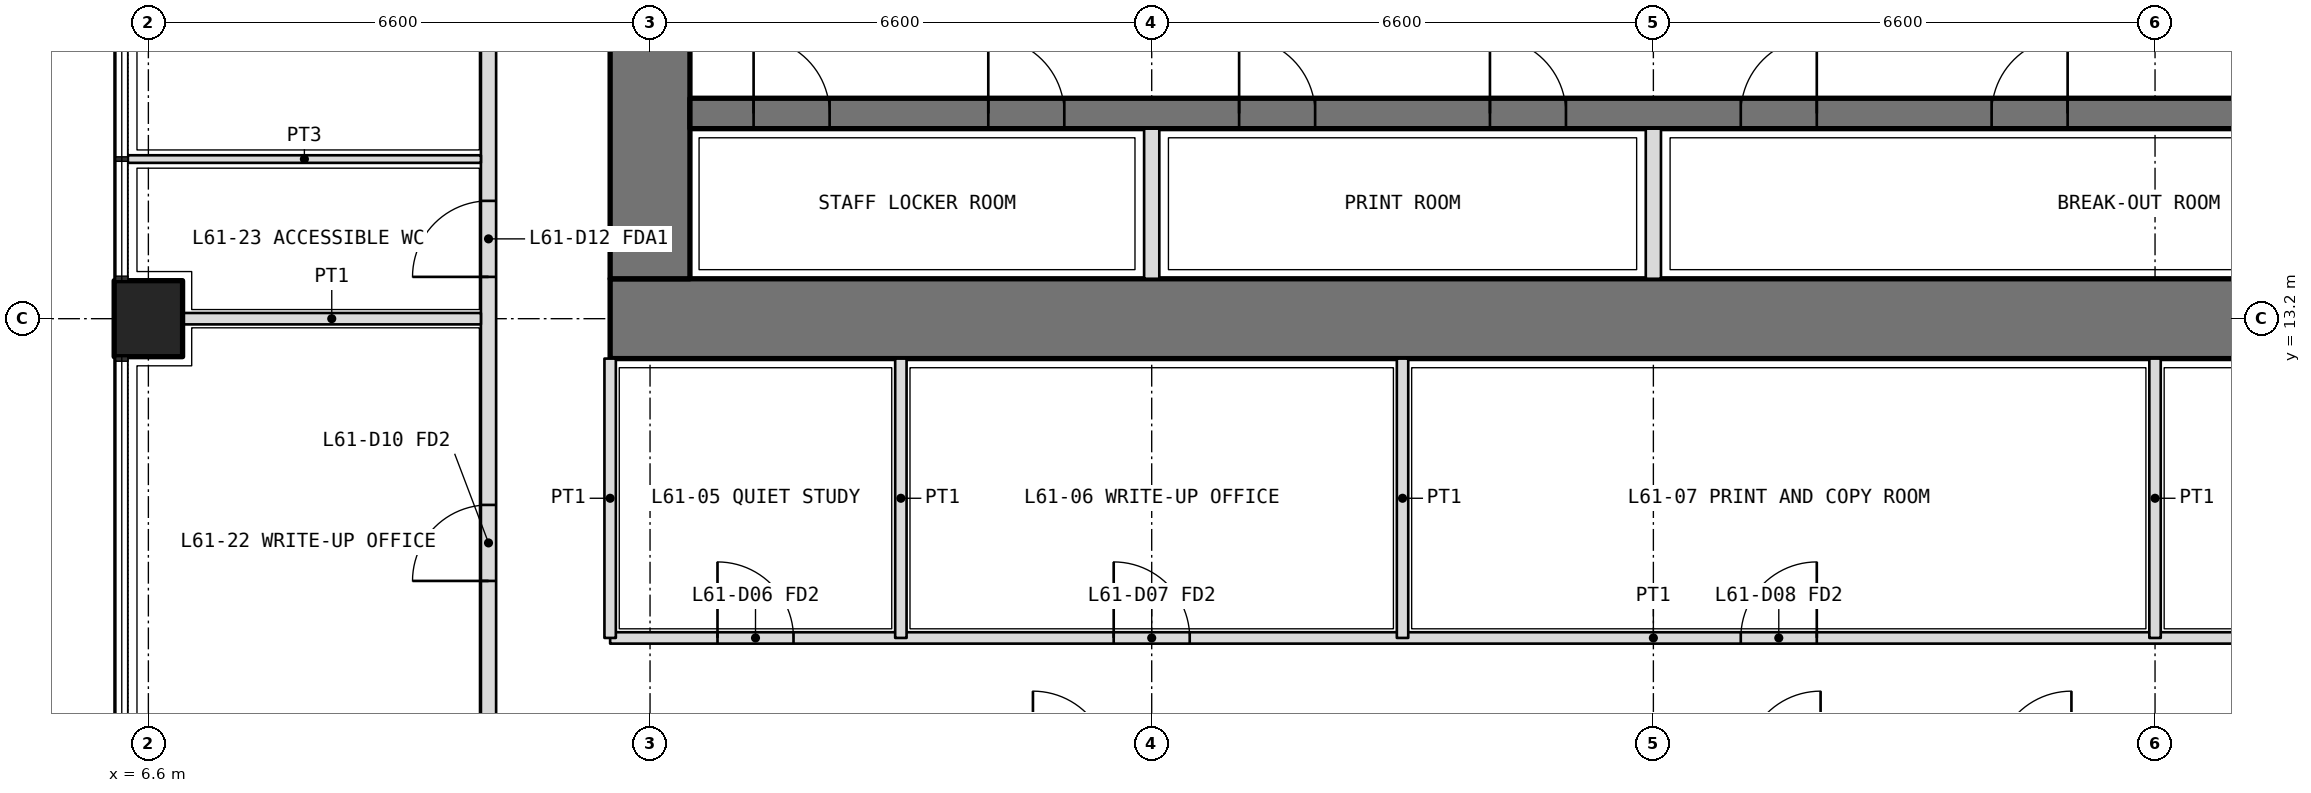
"""IFC4 building model, lengths in metres.
Left out: names, types, materials, properties, quantities, classifications, styles, units other than length and angle.
Written with IfcOpenShell. Run it as: python <this file> out.ifc"""

import sys

from ifc_helpers import new_model, si_unit, direction, frame, frame_2d, origin, origin_2d, place, context, subcontext, project, spatial, rectangle, extrude, element, fill, save


model = new_model("IFC4")
c1 = context("Model", 3, precision=1e-05, world=origin(), true_north=direction((0.0, 1.0)))
c2 = subcontext(c1, "Body", "Model", "MODEL_VIEW")
j1 = project(units=[si_unit("LENGTHUNIT", "METRE"), si_unit("PLANEANGLEUNIT", "RADIAN")], contexts=[c1])
p1 = place(None, origin())
s1 = spatial("IfcSite", under=j1, at=p1, CompositionType="ELEMENT")
p2 = place(p1, origin())
s2 = spatial("IfcBuilding", under=s1, at=p2, CompositionType="ELEMENT")
p3 = place(p2, frame((0.0, 0.0, 267.0)))
s3 = spatial("IfcBuildingStorey", under=s2, at=p3, CompositionType="ELEMENT", Elevation=267.0)
p4 = place(p3, frame((6.6, 13.2, 0.0), z_axis=(0.0, 0.0, 1.0), x_axis=(0.0, 1.0, 0.0)))
e1 = element("IfcColumn", 1, at=p4, inside=s3, PredefinedType="COLUMN", context=c2, shape_type="SweptSolid", body=[
    extrude(rectangle(XDim=1.0, YDim=0.9, at=origin_2d()), origin(), (0.0, 0.0, 1.0), 4.2),
])
p5 = place(p3, frame((12.675, 13.2, 0.0), z_axis=(0.0, 0.0, 1.0), x_axis=(1.0, 0.0, 0.0)))
e2 = element("IfcWall", 2, at=p5, inside=s3, PredefinedType="SHEAR", context=c2, shape_type="SweptSolid", body=[
    extrude(rectangle(XDim=27.45, YDim=1.05, at=frame_2d((13.725, 0.0))), origin(), (0.0, 0.0, 1.0), 4.2),
])
p6 = place(p3, frame((13.2, 32.475, 0.0), z_axis=(0.0, 0.0, 1.0), x_axis=(0.0, -1.0, 0.0)))
e3 = element("IfcWall", 3, at=p6, inside=s3, PredefinedType="SHEAR", context=c2, shape_type="SweptSolid", body=[
    extrude(rectangle(XDim=18.75, YDim=1.05, at=frame_2d((9.375, 0.0))), origin(), (0.0, 0.0, 1.0), 4.2),
])
p7 = place(p6, frame((14.125, 0.0, 0.0)))
e4 = element("IfcOpeningElement", 4, at=p7, cuts=e3, PredefinedType="OPENING", context=c2, shape_type="SweptSolid", body=[
    extrude(rectangle(XDim=1.6, YDim=2.1, at=frame_2d((0.8, 1.05))), frame((0.0, 0.535, 0.0), z_axis=(0.0, -1.0, 0.0), x_axis=(1.0, 0.0, 0.0)), (0.0, 0.0, 1.0), 1.07),
])
p8 = place(p6, frame((3.325, 0.0, 0.0)))
e5 = element("IfcOpeningElement", 5, at=p8, cuts=e3, PredefinedType="OPENING", context=c2, shape_type="SweptSolid", body=[
    extrude(rectangle(XDim=1.6, YDim=2.1, at=frame_2d((0.8, 1.05))), frame((0.0, 0.535, 0.0), z_axis=(0.0, -1.0, 0.0), x_axis=(1.0, 0.0, 0.0)), (0.0, 0.0, 1.0), 1.07),
])
p9 = place(p3, frame((13.725, 15.9, 0.0), z_axis=(0.0, 0.0, 1.0), x_axis=(1.0, 0.0, 0.0)))
e6 = element("IfcWall", 6, at=p9, inside=s3, PredefinedType="SHEAR", context=c2, shape_type="SweptSolid", body=[
    extrude(rectangle(XDim=25.35, YDim=0.4, at=frame_2d((12.675, 0.0))), origin(), (0.0, 0.0, 1.0), 4.2),
])
p10 = place(p9, frame((0.837, 0.0, 0.0)))
e7 = element("IfcOpeningElement", 7, at=p10, cuts=e6, PredefinedType="OPENING", context=c2, shape_type="SweptSolid", body=[
    extrude(rectangle(XDim=1.0, YDim=2.1, at=frame_2d((0.5, 1.05))), frame((0.0, 0.21, 0.0), z_axis=(0.0, -1.0, 0.0), x_axis=(1.0, 0.0, 0.0)), (0.0, 0.0, 1.0), 0.42),
])
p11 = place(p9, frame((3.925, 0.0, 0.0)))
e8 = element("IfcOpeningElement", 8, at=p11, cuts=e6, PredefinedType="OPENING", context=c2, shape_type="SweptSolid", body=[
    extrude(rectangle(XDim=1.0, YDim=2.1, at=frame_2d((0.5, 1.05))), frame((0.0, 0.21, 0.0), z_axis=(0.0, -1.0, 0.0), x_axis=(1.0, 0.0, 0.0)), (0.0, 0.0, 1.0), 0.42),
])
p12 = place(p9, frame((7.225, 0.0, 0.0)))
e9 = element("IfcOpeningElement", 9, at=p12, cuts=e6, PredefinedType="OPENING", context=c2, shape_type="SweptSolid", body=[
    extrude(rectangle(XDim=1.0, YDim=2.1, at=frame_2d((0.5, 1.05))), frame((0.0, 0.21, 0.0), z_axis=(0.0, -1.0, 0.0), x_axis=(1.0, 0.0, 0.0)), (0.0, 0.0, 1.0), 0.42),
])
p13 = place(p9, frame((10.525, 0.0, 0.0)))
e10 = element("IfcOpeningElement", 10, at=p13, cuts=e6, PredefinedType="OPENING", context=c2, shape_type="SweptSolid", body=[
    extrude(rectangle(XDim=1.0, YDim=2.1, at=frame_2d((0.5, 1.05))), frame((0.0, 0.21, 0.0), z_axis=(0.0, -1.0, 0.0), x_axis=(1.0, 0.0, 0.0)), (0.0, 0.0, 1.0), 0.42),
])
p14 = place(p9, frame((13.825, 0.0, 0.0)))
e11 = element("IfcOpeningElement", 11, at=p14, cuts=e6, PredefinedType="OPENING", context=c2, shape_type="SweptSolid", body=[
    extrude(rectangle(XDim=1.0, YDim=2.1, at=frame_2d((0.5, 1.05))), frame((0.0, 0.21, 0.0), z_axis=(0.0, -1.0, 0.0), x_axis=(1.0, 0.0, 0.0)), (0.0, 0.0, 1.0), 0.42),
])
p15 = place(p9, frame((17.125, 0.0, 0.0)))
e12 = element("IfcOpeningElement", 12, at=p15, cuts=e6, PredefinedType="OPENING", context=c2, shape_type="SweptSolid", body=[
    extrude(rectangle(XDim=1.0, YDim=2.1, at=frame_2d((0.5, 1.05))), frame((0.0, 0.21, 0.0), z_axis=(0.0, -1.0, 0.0), x_axis=(1.0, 0.0, 0.0)), (0.0, 0.0, 1.0), 0.42),
])
p16 = place(p9, frame((20.425, 0.0, 0.0)))
e13 = element("IfcOpeningElement", 13, at=p16, cuts=e6, PredefinedType="OPENING", context=c2, shape_type="SweptSolid", body=[
    extrude(rectangle(XDim=1.0, YDim=2.1, at=frame_2d((0.5, 1.05))), frame((0.0, 0.21, 0.0), z_axis=(0.0, -1.0, 0.0), x_axis=(1.0, 0.0, 0.0)), (0.0, 0.0, 1.0), 0.42),
])
p17 = place(p9, frame((23.512, 0.0, 0.0)))
e14 = element("IfcOpeningElement", 14, at=p17, cuts=e6, PredefinedType="OPENING", context=c2, shape_type="SweptSolid", body=[
    extrude(rectangle(XDim=1.0, YDim=2.1, at=frame_2d((0.5, 1.05))), frame((0.0, 0.21, 0.0), z_axis=(0.0, -1.0, 0.0), x_axis=(1.0, 0.0, 0.0)), (0.0, 0.0, 1.0), 0.42),
])
for number, where, z_axis, x_axis in (
    (15, (19.8, 13.725, 0.0), (0.0, 0.0, 1.0), (0.0, 1.0, 0.0)),
    (16, (26.4, 13.725, 0.0), (0.0, 0.0, 1.0), (0.0, 1.0, 0.0)),
):
    element("IfcWall", number, at=place(p3, frame(where, z_axis=z_axis, x_axis=x_axis)), inside=s3, PredefinedType="PARTITIONING", context=c2, shape_type="SweptSolid", body=[
        extrude(rectangle(XDim=1.975, YDim=0.2, at=frame_2d((0.987, 0.0))), origin(), (0.0, 0.0, 1.0), 4.2),
    ])
p18 = place(p3, frame((12.675, 9.0, 0.0), z_axis=(0.0, 0.0, 1.0), x_axis=(1.0, 0.0, 0.0)))
e17 = element("IfcWall", 17, at=p18, inside=s3, PredefinedType="PARTITIONING", context=c2, shape_type="SweptSolid", body=[
    extrude(rectangle(XDim=27.45, YDim=0.15, at=frame_2d((13.725, 0.0))), origin(), (0.0, 0.0, 1.0), 3.0),
])
p19 = place(p18, frame((1.413, 0.0, 0.0)))
e18 = element("IfcOpeningElement", 18, at=p19, cuts=e17, PredefinedType="OPENING", context=c2, shape_type="SweptSolid", body=[
    extrude(rectangle(XDim=1.0, YDim=2.1, at=frame_2d((0.5, 1.05))), frame((0.0, 0.085, 0.0), z_axis=(0.0, -1.0, 0.0), x_axis=(1.0, 0.0, 0.0)), (0.0, 0.0, 1.0), 0.17),
])
p20 = place(p18, frame((6.625, 0.0, 0.0)))
e19 = element("IfcOpeningElement", 19, at=p20, cuts=e17, PredefinedType="OPENING", context=c2, shape_type="SweptSolid", body=[
    extrude(rectangle(XDim=1.0, YDim=2.1, at=frame_2d((0.5, 1.05))), frame((0.0, 0.085, 0.0), z_axis=(0.0, -1.0, 0.0), x_axis=(1.0, 0.0, 0.0)), (0.0, 0.0, 1.0), 0.17),
])
p21 = place(p18, frame((14.875, 0.0, 0.0)))
e20 = element("IfcOpeningElement", 20, at=p21, cuts=e17, PredefinedType="OPENING", context=c2, shape_type="SweptSolid", body=[
    extrude(rectangle(XDim=1.0, YDim=2.1, at=frame_2d((0.5, 1.05))), frame((0.0, 0.085, 0.0), z_axis=(0.0, -1.0, 0.0), x_axis=(1.0, 0.0, 0.0)), (0.0, 0.0, 1.0), 0.17),
])
p22 = place(p18, frame((23.387, 0.0, 0.0)))
e21 = element("IfcOpeningElement", 21, at=p22, cuts=e17, PredefinedType="OPENING", context=c2, shape_type="SweptSolid", body=[
    extrude(rectangle(XDim=1.0, YDim=2.1, at=frame_2d((0.5, 1.05))), frame((0.0, 0.085, 0.0), z_axis=(0.0, -1.0, 0.0), x_axis=(1.0, 0.0, 0.0)), (0.0, 0.0, 1.0), 0.17),
])
p23 = place(p3, frame((12.675, 12.675, 0.0), z_axis=(0.0, 0.0, 1.0), x_axis=(0.0, -1.0, 0.0)))
e22 = element("IfcWall", 22, at=p23, inside=s3, PredefinedType="PARTITIONING", context=c2, shape_type="SweptSolid", body=[
    extrude(rectangle(XDim=3.675, YDim=0.15, at=frame_2d((1.837, 0.0))), origin(), (0.0, 0.0, 1.0), 3.0),
])
for number, where, z_axis, x_axis in (
    (23, (16.5, 12.675, 0.0), (0.0, 0.0, 1.0), (0.0, -1.0, 0.0)),
    (24, (23.1, 12.675, 0.0), (0.0, 0.0, 1.0), (0.0, -1.0, 0.0)),
):
    element("IfcWall", number, at=place(p3, frame(where, z_axis=z_axis, x_axis=x_axis)), inside=s3, PredefinedType="PARTITIONING", context=c2, shape_type="SweptSolid", body=[
        extrude(rectangle(XDim=3.675, YDim=0.15, at=frame_2d((1.837, 0.0))), origin(), (0.0, 0.0, 1.0), 3.9),
    ])
p24 = place(p3, frame((33.0, 12.675, 0.0), z_axis=(0.0, 0.0, 1.0), x_axis=(0.0, -1.0, 0.0)))
e25 = element("IfcWall", 25, at=p24, inside=s3, PredefinedType="PARTITIONING", context=c2, shape_type="SweptSolid", body=[
    extrude(rectangle(XDim=3.675, YDim=0.15, at=frame_2d((1.837, 0.0))), origin(), (0.0, 0.0, 1.0), 3.0),
])
p25 = place(p3, frame((11.075, 7.4, 0.0), z_axis=(0.0, 0.0, 1.0), x_axis=(0.0, 1.0, 0.0)))
e26 = element("IfcWall", 26, at=p25, inside=s3, PredefinedType="PARTITIONING", context=c2, shape_type="SweptSolid", body=[
    extrude(rectangle(XDim=31.4, YDim=0.2, at=frame_2d((15.7, 0.0))), origin(), (0.0, 0.0, 1.0), 3.0),
])
p26 = place(p25, frame((2.35, 0.0, 0.0)))
e27 = element("IfcOpeningElement", 27, at=p26, cuts=e26, PredefinedType="OPENING", context=c2, shape_type="SweptSolid", body=[
    extrude(rectangle(XDim=1.0, YDim=2.1, at=frame_2d((0.5, 1.05))), frame((0.0, 0.11, 0.0), z_axis=(0.0, -1.0, 0.0), x_axis=(1.0, 0.0, 0.0)), (0.0, 0.0, 1.0), 0.22),
])
p27 = place(p25, frame((6.35, 0.0, 0.0)))
e28 = element("IfcOpeningElement", 28, at=p27, cuts=e26, PredefinedType="OPENING", context=c2, shape_type="SweptSolid", body=[
    extrude(rectangle(XDim=1.0, YDim=2.1, at=frame_2d((0.5, 1.05))), frame((0.0, 0.11, 0.0), z_axis=(0.0, -1.0, 0.0), x_axis=(1.0, 0.0, 0.0)), (0.0, 0.0, 1.0), 0.22),
])
p28 = place(p25, frame((9.45, 0.0, 0.0)))
e29 = element("IfcOpeningElement", 29, at=p28, cuts=e26, PredefinedType="OPENING", context=c2, shape_type="SweptSolid", body=[
    extrude(rectangle(XDim=0.9, YDim=2.1, at=frame_2d((0.45, 1.05))), frame((0.0, 0.11, 0.0), z_axis=(0.0, -1.0, 0.0), x_axis=(1.0, 0.0, 0.0)), (0.0, 0.0, 1.0), 0.22),
])
p29 = place(p25, frame((13.35, 0.0, 0.0)))
e30 = element("IfcOpeningElement", 30, at=p29, cuts=e26, PredefinedType="OPENING", context=c2, shape_type="SweptSolid", body=[
    extrude(rectangle(XDim=0.9, YDim=2.1, at=frame_2d((0.45, 1.05))), frame((0.0, 0.11, 0.0), z_axis=(0.0, -1.0, 0.0), x_axis=(1.0, 0.0, 0.0)), (0.0, 0.0, 1.0), 0.22),
])
p30 = place(p25, frame((18.5, 0.0, 0.0)))
e31 = element("IfcOpeningElement", 31, at=p30, cuts=e26, PredefinedType="OPENING", context=c2, shape_type="SweptSolid", body=[
    extrude(rectangle(XDim=1.0, YDim=2.1, at=frame_2d((0.5, 1.05))), frame((0.0, 0.11, 0.0), z_axis=(0.0, -1.0, 0.0), x_axis=(1.0, 0.0, 0.0)), (0.0, 0.0, 1.0), 0.22),
])
p31 = place(p25, frame((23.45, 0.0, 0.0)))
e32 = element("IfcOpeningElement", 32, at=p31, cuts=e26, PredefinedType="OPENING", context=c2, shape_type="SweptSolid", body=[
    extrude(rectangle(XDim=1.0, YDim=2.1, at=frame_2d((0.5, 1.05))), frame((0.0, 0.11, 0.0), z_axis=(0.0, -1.0, 0.0), x_axis=(1.0, 0.0, 0.0)), (0.0, 0.0, 1.0), 0.22),
])
p32 = place(p25, frame((28.05, 0.0, 0.0)))
e33 = element("IfcOpeningElement", 33, at=p32, cuts=e26, PredefinedType="OPENING", context=c2, shape_type="SweptSolid", body=[
    extrude(rectangle(XDim=1.0, YDim=2.1, at=frame_2d((0.5, 1.05))), frame((0.0, 0.11, 0.0), z_axis=(0.0, -1.0, 0.0), x_axis=(1.0, 0.0, 0.0)), (0.0, 0.0, 1.0), 0.22),
])
p33 = place(p3, frame((6.33, 15.3, 0.0), z_axis=(0.0, 0.0, 1.0), x_axis=(1.0, 0.0, 0.0)))
e34 = element("IfcWall", 34, at=p33, inside=s3, PredefinedType="PARTITIONING", context=c2, shape_type="SweptSolid", body=[
    extrude(rectangle(XDim=4.645, YDim=0.1, at=frame_2d((2.323, 0.0))), origin(), (0.0, 0.0, 1.0), 2.7),
])
p34 = place(p3, frame((7.05, 13.2, 0.0), z_axis=(0.0, 0.0, 1.0), x_axis=(1.0, 0.0, 0.0)))
e35 = element("IfcWall", 35, at=p34, inside=s3, PredefinedType="PARTITIONING", context=c2, shape_type="SweptSolid", body=[
    extrude(rectangle(XDim=3.925, YDim=0.15, at=frame_2d((1.962, 0.0))), origin(), (0.0, 0.0, 1.0), 3.0),
])
p35 = place(p19, origin())
e36 = element("IfcDoor", 36, at=p35, inside=s3, OperationType="SINGLE_SWING_LEFT", PredefinedType="DOOR", context=c2, shape_type="SweptSolid", body=[
    extrude(rectangle(XDim=1.0, YDim=2.1, at=frame_2d((0.5, 1.05))), frame((0.0, 0.025, 0.0), z_axis=(0.0, -1.0, 0.0), x_axis=(1.0, 0.0, 0.0)), (0.0, 0.0, 1.0), 0.05),
])
fill(e18, e36)
p36 = place(p20, origin())
e37 = element("IfcDoor", 37, at=p36, inside=s3, OperationType="SINGLE_SWING_LEFT", PredefinedType="DOOR", context=c2, shape_type="SweptSolid", body=[
    extrude(rectangle(XDim=1.0, YDim=2.1, at=frame_2d((0.5, 1.05))), frame((0.0, 0.025, 0.0), z_axis=(0.0, -1.0, 0.0), x_axis=(1.0, 0.0, 0.0)), (0.0, 0.0, 1.0), 0.05),
])
fill(e19, e37)
p37 = place(p21, origin())
e38 = element("IfcDoor", 38, at=p37, inside=s3, OperationType="SINGLE_SWING_RIGHT", PredefinedType="DOOR", context=c2, shape_type="SweptSolid", body=[
    extrude(rectangle(XDim=1.0, YDim=2.1, at=frame_2d((0.5, 1.05))), frame((0.0, 0.025, 0.0), z_axis=(0.0, -1.0, 0.0), x_axis=(1.0, 0.0, 0.0)), (0.0, 0.0, 1.0), 0.05),
])
fill(e20, e38)
p38 = place(p26, origin())
e39 = element("IfcDoor", 39, at=p38, inside=s3, OperationType="SINGLE_SWING_LEFT", PredefinedType="DOOR", context=c2, shape_type="SweptSolid", body=[
    extrude(rectangle(XDim=1.0, YDim=2.1, at=frame_2d((0.5, 1.05))), frame((0.0, 0.025, 0.0), z_axis=(0.0, -1.0, 0.0), x_axis=(1.0, 0.0, 0.0)), (0.0, 0.0, 1.0), 0.05),
])
fill(e27, e39)
p39 = place(p27, origin())
e40 = element("IfcDoor", 40, at=p39, inside=s3, OperationType="SINGLE_SWING_LEFT", PredefinedType="DOOR", context=c2, shape_type="SweptSolid", body=[
    extrude(rectangle(XDim=1.0, YDim=2.1, at=frame_2d((0.5, 1.05))), frame((0.0, 0.025, 0.0), z_axis=(0.0, -1.0, 0.0), x_axis=(1.0, 0.0, 0.0)), (0.0, 0.0, 1.0), 0.05),
])
fill(e28, e40)
p40 = place(p10, origin())
e41 = element("IfcDoor", 41, at=p40, inside=s3, OperationType="SINGLE_SWING_LEFT", PredefinedType="DOOR", context=c2, shape_type="SweptSolid", body=[
    extrude(rectangle(XDim=1.0, YDim=2.1, at=frame_2d((0.5, 1.05))), frame((0.0, 0.025, 0.0), z_axis=(0.0, -1.0, 0.0), x_axis=(1.0, 0.0, 0.0)), (0.0, 0.0, 1.0), 0.05),
])
fill(e7, e41)
p41 = place(p11, origin())
e42 = element("IfcDoor", 42, at=p41, inside=s3, OperationType="SINGLE_SWING_LEFT", PredefinedType="DOOR", context=c2, shape_type="SweptSolid", body=[
    extrude(rectangle(XDim=1.0, YDim=2.1, at=frame_2d((0.5, 1.05))), frame((0.0, 0.025, 0.0), z_axis=(0.0, -1.0, 0.0), x_axis=(1.0, 0.0, 0.0)), (0.0, 0.0, 1.0), 0.05),
])
fill(e8, e42)
p42 = place(p12, origin())
e43 = element("IfcDoor", 43, at=p42, inside=s3, OperationType="SINGLE_SWING_LEFT", PredefinedType="DOOR", context=c2, shape_type="SweptSolid", body=[
    extrude(rectangle(XDim=1.0, YDim=2.1, at=frame_2d((0.5, 1.05))), frame((0.0, 0.025, 0.0), z_axis=(0.0, -1.0, 0.0), x_axis=(1.0, 0.0, 0.0)), (0.0, 0.0, 1.0), 0.05),
])
fill(e9, e43)
p43 = place(p13, origin())
e44 = element("IfcDoor", 44, at=p43, inside=s3, OperationType="SINGLE_SWING_LEFT", PredefinedType="DOOR", context=c2, shape_type="SweptSolid", body=[
    extrude(rectangle(XDim=1.0, YDim=2.1, at=frame_2d((0.5, 1.05))), frame((0.0, 0.025, 0.0), z_axis=(0.0, -1.0, 0.0), x_axis=(1.0, 0.0, 0.0)), (0.0, 0.0, 1.0), 0.05),
])
fill(e10, e44)
p44 = place(p14, origin())
e45 = element("IfcDoor", 45, at=p44, inside=s3, OperationType="SINGLE_SWING_RIGHT", PredefinedType="DOOR", context=c2, shape_type="SweptSolid", body=[
    extrude(rectangle(XDim=1.0, YDim=2.1, at=frame_2d((0.5, 1.05))), frame((0.0, 0.025, 0.0), z_axis=(0.0, -1.0, 0.0), x_axis=(1.0, 0.0, 0.0)), (0.0, 0.0, 1.0), 0.05),
])
fill(e11, e45)
p45 = place(p15, origin())
e46 = element("IfcDoor", 46, at=p45, inside=s3, OperationType="SINGLE_SWING_RIGHT", PredefinedType="DOOR", context=c2, shape_type="SweptSolid", body=[
    extrude(rectangle(XDim=1.0, YDim=2.1, at=frame_2d((0.5, 1.05))), frame((0.0, 0.025, 0.0), z_axis=(0.0, -1.0, 0.0), x_axis=(1.0, 0.0, 0.0)), (0.0, 0.0, 1.0), 0.05),
])
fill(e12, e46)
save(model, sys.argv[1])
